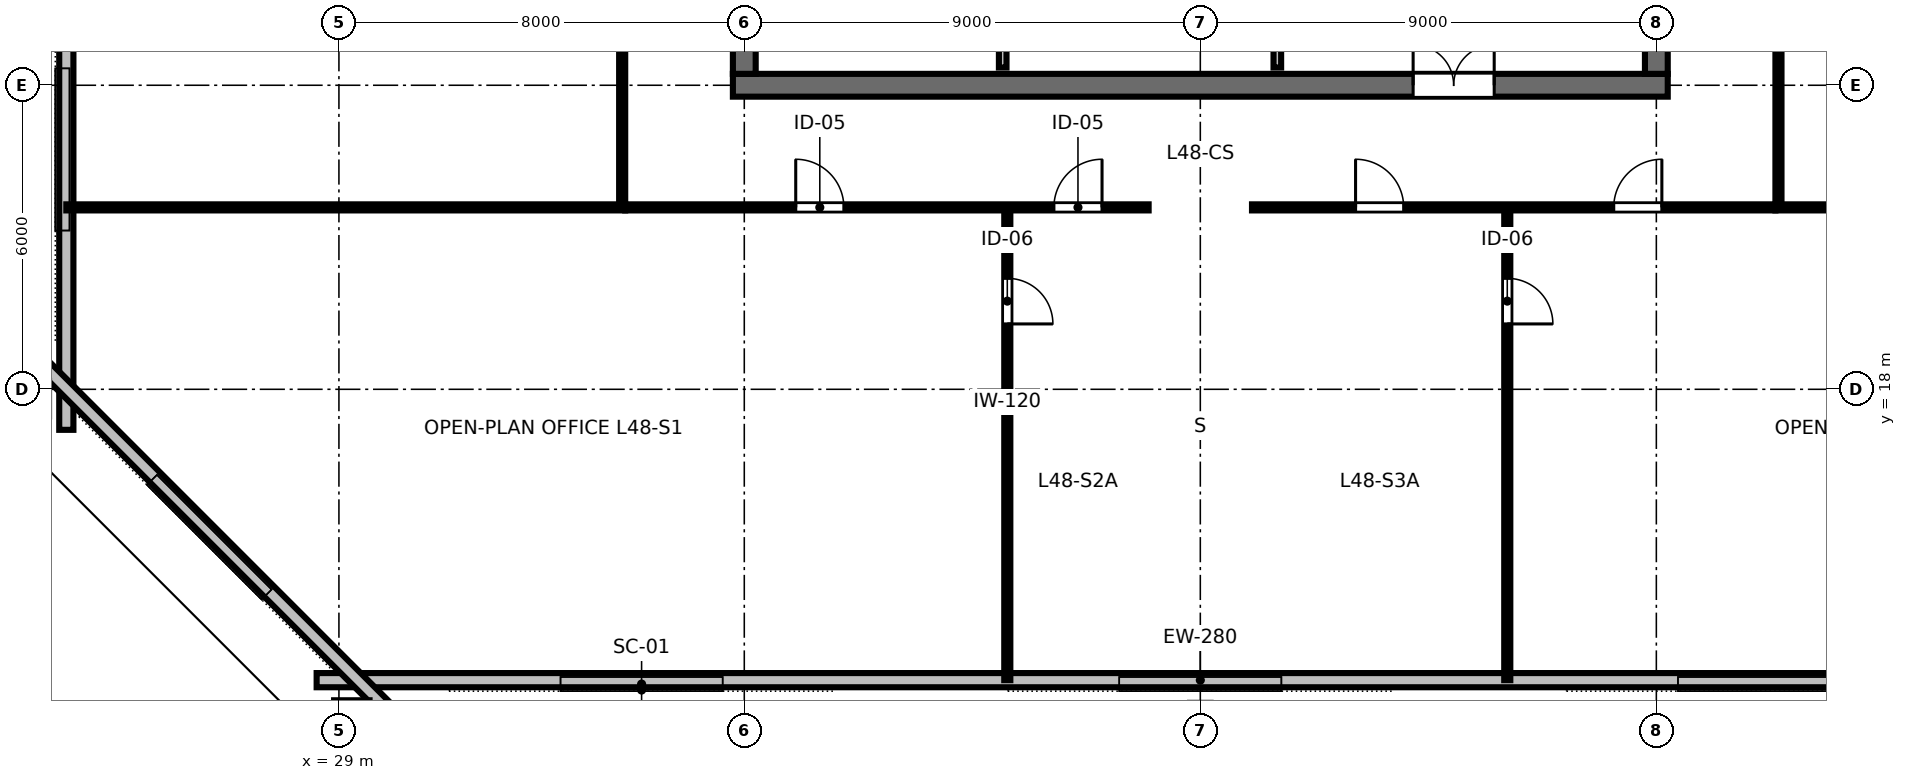
"""IFC4 building model, lengths in metres.
Left out: names, types, materials, properties, quantities, classifications, styles, units other than length and angle.
Written with IfcOpenShell. Run it as: python <this file> out.ifc"""

import sys

from ifc_helpers import new_model, si_unit, direction, frame, frame_2d, origin, origin_2d, place, context, subcontext, project, spatial, rectangle, hollow_rectangle, i_section, extrude, element, fill, save


model = new_model("IFC4")
c1 = context("Model", 3, precision=1e-05, world=origin(), true_north=direction((0.0, 1.0)))
c2 = subcontext(c1, "Body", "Model", "MODEL_VIEW")
j1 = project(units=[si_unit("LENGTHUNIT", "METRE"), si_unit("PLANEANGLEUNIT", "RADIAN")], contexts=[c1])
p1 = place(None, origin())
s1 = spatial("IfcSite", under=j1, at=p1, CompositionType="ELEMENT")
p2 = place(p1, origin())
s2 = spatial("IfcBuilding", under=s1, at=p2, CompositionType="ELEMENT")
p3 = place(p2, frame((0.0, 0.0, 184.2)))
s3 = spatial("IfcBuildingStorey", under=s2, at=p3, CompositionType="ELEMENT", Elevation=184.2)
p4 = place(p3, frame((36.775, 24.0, 0.0), z_axis=(0.0, 0.0, 1.0), x_axis=(1.0, 0.0, 0.0)))
e1 = element("IfcWall", 1, at=p4, inside=s3, PredefinedType="SHEAR", context=c2, shape_type="SweptSolid", body=[
    extrude(rectangle(XDim=18.45, YDim=0.45, at=frame_2d((9.225, 0.0))), origin(), (0.0, 0.0, 1.0), 3.36),
])
p5 = place(p4, frame((13.425, 0.0, 0.0)))
e2 = element("IfcOpeningElement", 2, at=p5, cuts=e1, PredefinedType="OPENING", context=c2, shape_type="SweptSolid", body=[
    extrude(rectangle(XDim=1.6, YDim=2.15, at=frame_2d((0.8, 1.075))), frame((0.0, 0.235, 0.0), z_axis=(0.0, -1.0, 0.0), x_axis=(1.0, 0.0, 0.0)), (0.0, 0.0, 1.0), 0.47),
])
p6 = place(p3, frame((37.0, 24.225, 0.0), z_axis=(0.0, 0.0, 1.0), x_axis=(0.0, 1.0, 0.0)))
e3 = element("IfcWall", 3, at=p6, inside=s3, PredefinedType="SHEAR", context=c2, shape_type="SweptSolid", body=[
    extrude(rectangle(XDim=15.55, YDim=0.45, at=frame_2d((7.775, 0.0))), origin(), (0.0, 0.0, 1.0), 3.36),
])
p7 = place(p6, frame((5.3, 0.0, 0.0)))
e4 = element("IfcOpeningElement", 4, at=p7, cuts=e3, PredefinedType="OPENING", context=c2, shape_type="SweptSolid", body=[
    extrude(rectangle(XDim=1.15, YDim=2.15, at=frame_2d((0.575, 1.075))), frame((0.0, 0.235, 0.0), z_axis=(0.0, -1.0, 0.0), x_axis=(1.0, 0.0, 0.0)), (0.0, 0.0, 1.0), 0.47),
])
p8 = place(p3, frame((55.0, 24.225, 0.0), z_axis=(0.0, 0.0, 1.0), x_axis=(0.0, 1.0, 0.0)))
e5 = element("IfcWall", 5, at=p8, inside=s3, PredefinedType="SHEAR", context=c2, shape_type="SweptSolid", body=[
    extrude(rectangle(XDim=15.55, YDim=0.45, at=frame_2d((7.775, 0.0))), origin(), (0.0, 0.0, 1.0), 3.36),
])
p9 = place(p8, frame((5.3, 0.0, 0.0)))
e6 = element("IfcOpeningElement", 6, at=p9, cuts=e5, PredefinedType="OPENING", context=c2, shape_type="SweptSolid", body=[
    extrude(rectangle(XDim=1.15, YDim=2.15, at=frame_2d((0.575, 1.075))), frame((0.0, 0.235, 0.0), z_axis=(0.0, -1.0, 0.0), x_axis=(1.0, 0.0, 0.0)), (0.0, 0.0, 1.0), 0.47),
])
p10 = place(p3, frame((29.255, 11.438, 0.0), z_axis=(0.252686968591, 0.187893668889, 0.949128687321), x_axis=(-0.596699148139, 0.802465031394, 0.0)))
e7 = element("IfcColumn", 7, at=p10, inside=s3, PredefinedType="COLUMN", context=c2, shape_type="SweptSolid", body=[
    extrude(hollow_rectangle(XDim=0.7, YDim=0.85, WallThickness=0.04, at=origin_2d()), origin(), (0.0, 0.0, 1.0), 3.538),
])
p11 = place(p3, frame((46.0, 11.6, 0.0), z_axis=(0.0, 0.192822575522, 0.981233639033), x_axis=(-1.0, 0.0, 0.0)))
e8 = element("IfcColumn", 8, at=p11, inside=s3, PredefinedType="COLUMN", context=c2, shape_type="SweptSolid", body=[
    extrude(i_section(OverallWidth=0.406, OverallDepth=0.425, WebThickness=0.033, FlangeThickness=0.052, FilletRadius=0.025, at=origin_2d()), origin(), (0.0, 0.0, 1.0), 3.422),
])
p12 = place(p3, frame((22.854, 17.816, 0.0), z_axis=(0.221678120535, 0.219053075792, 0.950197116846), x_axis=(-0.67588069394, -0.66787712075, 0.311649545384)))
e9 = element("IfcColumn", 9, at=p12, inside=s3, PredefinedType="COLUMN", context=c2, shape_type="SweptSolid", body=[
    extrude(hollow_rectangle(XDim=0.7, YDim=0.85, WallThickness=0.04, at=origin_2d()), origin(), (0.0, 0.0, 1.0), 3.534),
])
p13 = place(p3, frame((28.56, 12.26, 0.0), z_axis=(0.0, 0.0, 1.0), x_axis=(1.0, 0.0, 0.0)))
e10 = element("IfcWall", 10, at=p13, inside=s3, PredefinedType="STANDARD", context=c2, shape_type="SweptSolid", body=[
    extrude(rectangle(XDim=34.88, YDim=0.28, at=frame_2d((17.44, 0.0))), origin(), (0.0, 0.0, 1.0), 2.817),
])
p14 = place(p3, frame((23.62, 46.8, 0.0), z_axis=(0.0, 0.0, 1.0), x_axis=(0.0, -1.0, 0.0)))
e11 = element("IfcWall", 11, at=p14, inside=s3, PredefinedType="STANDARD", context=c2, shape_type="SweptSolid", body=[
    extrude(rectangle(XDim=29.6, YDim=0.28, at=frame_2d((14.8, 0.0))), origin(), (0.0, 0.0, 1.0), 2.817),
])
p15 = place(p3, frame((23.046, 18.585, 0.0), z_axis=(0.0, 0.0, 1.0), x_axis=(0.707106781187, -0.707106781187, 0.0)))
e12 = element("IfcWall", 12, at=p15, inside=s3, PredefinedType="STANDARD", context=c2, shape_type="SweptSolid", body=[
    extrude(rectangle(XDim=9.757, YDim=0.28, at=frame_2d((4.879, 0.0))), origin(), (0.0, 0.0, 1.0), 3.36),
])
p16 = place(p3, frame((42.1, 24.35, 0.0), z_axis=(0.0, 0.0, 1.0), x_axis=(0.0, 1.0, 0.0)))
e13 = element("IfcWall", 13, at=p16, inside=s3, PredefinedType="PARTITIONING", context=c2, shape_type="SweptSolid", body=[
    extrude(rectangle(XDim=3.9, YDim=0.15, at=frame_2d((1.95, 0.0))), origin(), (0.0, 0.0, 1.0), 3.36),
])
p17 = place(p16, frame((1.5, 0.0, 0.0)))
e14 = element("IfcOpeningElement", 14, at=p17, cuts=e13, PredefinedType="OPENING", context=c2, shape_type="SweptSolid", body=[
    extrude(rectangle(XDim=0.9, YDim=2.15, at=frame_2d((0.45, 1.075))), frame((0.0, 0.085, 0.0), z_axis=(0.0, -1.0, 0.0), x_axis=(1.0, 0.0, 0.0)), (0.0, 0.0, 1.0), 0.17),
])
p18 = place(p3, frame((47.52, 24.35, 0.0), z_axis=(0.0, 0.0, 1.0), x_axis=(0.0, 1.0, 0.0)))
e15 = element("IfcWall", 15, at=p18, inside=s3, PredefinedType="PARTITIONING", context=c2, shape_type="SweptSolid", body=[
    extrude(rectangle(XDim=3.9, YDim=0.15, at=frame_2d((1.95, 0.0))), origin(), (0.0, 0.0, 1.0), 3.36),
])
p19 = place(p18, frame((0.35, 0.0, 0.0)))
e16 = element("IfcOpeningElement", 16, at=p19, cuts=e15, PredefinedType="OPENING", context=c2, shape_type="SweptSolid", body=[
    extrude(rectangle(XDim=0.9, YDim=2.15, at=frame_2d((0.45, 1.075))), frame((0.0, 0.085, 0.0), z_axis=(0.0, -1.0, 0.0), x_axis=(1.0, 0.0, 0.0)), (0.0, 0.0, 1.0), 0.17),
])
p20 = place(p3, frame((42.191, 21.59, 0.0), z_axis=(0.0, 0.0, 1.0), x_axis=(0.0, -1.0, 0.0)))
e17 = element("IfcWall", 17, at=p20, inside=s3, PredefinedType="PARTITIONING", context=c2, shape_type="SweptSolid", body=[
    extrude(rectangle(XDim=9.33, YDim=0.12, at=frame_2d((4.665, 0.0))), origin(), (0.0, 0.0, 1.0), 2.64),
])
p21 = place(p20, frame((1.4, 0.0, 0.0)))
e18 = element("IfcOpeningElement", 18, at=p21, cuts=e17, PredefinedType="OPENING", context=c2, shape_type="SweptSolid", body=[
    extrude(rectangle(XDim=0.9, YDim=2.15, at=frame_2d((0.45, 1.075))), frame((0.0, 0.07, 0.0), z_axis=(0.0, -1.0, 0.0), x_axis=(1.0, 0.0, 0.0)), (0.0, 0.0, 1.0), 0.14),
])
p22 = place(p3, frame((52.058, 21.59, 0.0), z_axis=(0.0, 0.0, 1.0), x_axis=(0.0, -1.0, 0.0)))
e19 = element("IfcWall", 19, at=p22, inside=s3, PredefinedType="PARTITIONING", context=c2, shape_type="SweptSolid", body=[
    extrude(rectangle(XDim=9.33, YDim=0.12, at=frame_2d((4.665, 0.0))), origin(), (0.0, 0.0, 1.0), 2.64),
])
p23 = place(p22, frame((1.4, 0.0, 0.0)))
e20 = element("IfcOpeningElement", 20, at=p23, cuts=e19, PredefinedType="OPENING", context=c2, shape_type="SweptSolid", body=[
    extrude(rectangle(XDim=0.9, YDim=2.15, at=frame_2d((0.45, 1.075))), frame((0.0, 0.07, 0.0), z_axis=(0.0, -1.0, 0.0), x_axis=(1.0, 0.0, 0.0)), (0.0, 0.0, 1.0), 0.14),
])
p24 = place(p3, frame((34.65, 21.59, 0.0), z_axis=(0.0, 0.0, 1.0), x_axis=(1.0, 0.0, 0.0)))
e21 = element("IfcWall", 21, at=p24, inside=s3, PredefinedType="PARTITIONING", context=c2, shape_type="SweptSolid", body=[
    extrude(rectangle(XDim=10.33, YDim=0.12, at=frame_2d((5.165, 0.0))), origin(), (0.0, 0.0, 1.0), 2.64),
])
p25 = place(p24, frame((3.365, 0.0, 0.0)))
e22 = element("IfcOpeningElement", 22, at=p25, cuts=e21, PredefinedType="OPENING", context=c2, shape_type="SweptSolid", body=[
    extrude(rectangle(XDim=0.95, YDim=2.15, at=frame_2d((0.475, 1.075))), frame((0.0, 0.07, 0.0), z_axis=(0.0, -1.0, 0.0), x_axis=(1.0, 0.0, 0.0)), (0.0, 0.0, 1.0), 0.14),
])
p26 = place(p24, frame((8.46, 0.0, 0.0)))
e23 = element("IfcOpeningElement", 23, at=p26, cuts=e21, PredefinedType="OPENING", context=c2, shape_type="SweptSolid", body=[
    extrude(rectangle(XDim=0.95, YDim=2.15, at=frame_2d((0.475, 1.075))), frame((0.0, 0.07, 0.0), z_axis=(0.0, -1.0, 0.0), x_axis=(1.0, 0.0, 0.0)), (0.0, 0.0, 1.0), 0.14),
])
p27 = place(p3, frame((47.02, 21.59, 0.0), z_axis=(0.0, 0.0, 1.0), x_axis=(1.0, 0.0, 0.0)))
e24 = element("IfcWall", 24, at=p27, inside=s3, PredefinedType="PARTITIONING", context=c2, shape_type="SweptSolid", body=[
    extrude(rectangle(XDim=10.33, YDim=0.12, at=frame_2d((5.165, 0.0))), origin(), (0.0, 0.0, 1.0), 2.64),
])
p28 = place(p27, frame((2.044, 0.0, 0.0)))
e25 = element("IfcOpeningElement", 25, at=p28, cuts=e24, PredefinedType="OPENING", context=c2, shape_type="SweptSolid", body=[
    extrude(rectangle(XDim=0.95, YDim=2.15, at=frame_2d((0.475, 1.075))), frame((0.0, 0.07, 0.0), z_axis=(0.0, -1.0, 0.0), x_axis=(1.0, 0.0, 0.0)), (0.0, 0.0, 1.0), 0.14),
])
p29 = place(p27, frame((7.139, 0.0, 0.0)))
e26 = element("IfcOpeningElement", 26, at=p29, cuts=e24, PredefinedType="OPENING", context=c2, shape_type="SweptSolid", body=[
    extrude(rectangle(XDim=0.95, YDim=2.15, at=frame_2d((0.475, 1.075))), frame((0.0, 0.07, 0.0), z_axis=(0.0, -1.0, 0.0), x_axis=(1.0, 0.0, 0.0)), (0.0, 0.0, 1.0), 0.14),
])
p30 = place(p3, frame((34.59, 21.65, 0.0), z_axis=(0.0, 0.0, 1.0), x_axis=(0.0, 1.0, 0.0)))
e27 = element("IfcWall", 27, at=p30, inside=s3, PredefinedType="PARTITIONING", context=c2, shape_type="SweptSolid", body=[
    extrude(rectangle(XDim=20.7, YDim=0.12, at=frame_2d((10.35, 0.0))), origin(), (0.0, 0.0, 1.0), 2.64),
])
p31 = place(p30, frame((9.875, 0.0, 0.0)))
e28 = element("IfcOpeningElement", 28, at=p31, cuts=e27, PredefinedType="OPENING", context=c2, shape_type="SweptSolid", body=[
    extrude(rectangle(XDim=0.95, YDim=2.15, at=frame_2d((0.475, 1.075))), frame((0.0, 0.07, 0.0), z_axis=(0.0, -1.0, 0.0), x_axis=(1.0, 0.0, 0.0)), (0.0, 0.0, 1.0), 0.14),
])
p32 = place(p3, frame((57.41, 21.65, 0.0), z_axis=(0.0, 0.0, 1.0), x_axis=(0.0, 1.0, 0.0)))
e29 = element("IfcWall", 29, at=p32, inside=s3, PredefinedType="PARTITIONING", context=c2, shape_type="SweptSolid", body=[
    extrude(rectangle(XDim=20.7, YDim=0.12, at=frame_2d((10.35, 0.0))), origin(), (0.0, 0.0, 1.0), 2.64),
])
p33 = place(p32, frame((6.073, 0.0, 0.0)))
e30 = element("IfcOpeningElement", 30, at=p33, cuts=e29, PredefinedType="OPENING", context=c2, shape_type="SweptSolid", body=[
    extrude(rectangle(XDim=0.95, YDim=2.15, at=frame_2d((0.475, 1.075))), frame((0.0, 0.07, 0.0), z_axis=(0.0, -1.0, 0.0), x_axis=(1.0, 0.0, 0.0)), (0.0, 0.0, 1.0), 0.14),
])
p34 = place(p32, frame((16.223, 0.0, 0.0)))
e31 = element("IfcOpeningElement", 31, at=p34, cuts=e29, PredefinedType="OPENING", context=c2, shape_type="SweptSolid", body=[
    extrude(rectangle(XDim=0.95, YDim=2.15, at=frame_2d((0.475, 1.075))), frame((0.0, 0.07, 0.0), z_axis=(0.0, -1.0, 0.0), x_axis=(1.0, 0.0, 0.0)), (0.0, 0.0, 1.0), 0.14),
])
for number, where, z_axis, x_axis in (
    (32, (34.65, 21.59, 0.0), (0.0, 0.0, 1.0), (-1.0, 0.0, 0.0)),
    (33, (57.35, 21.59, 0.0), (0.0, 0.0, 1.0), (1.0, 0.0, 0.0)),
):
    element("IfcWall", number, at=place(p3, frame(where, z_axis=z_axis, x_axis=x_axis)), inside=s3, PredefinedType="PARTITIONING", context=c2, shape_type="SweptSolid", body=[
        extrude(rectangle(XDim=11.03, YDim=0.12, at=frame_2d((5.515, 0.0))), origin(), (0.0, 0.0, 1.0), 2.64),
    ])
p35 = place(p5, origin())
e34 = element("IfcDoor", 34, at=p35, inside=s3, OperationType="DOUBLE_DOOR_SINGLE_SWING", PredefinedType="DOOR", context=c2, shape_type="SweptSolid", body=[
    extrude(rectangle(XDim=1.6, YDim=2.15, at=frame_2d((0.8, 1.075))), frame((0.0, 0.025, 0.0), z_axis=(0.0, -1.0, 0.0), x_axis=(1.0, 0.0, 0.0)), (0.0, 0.0, 1.0), 0.05),
])
fill(e2, e34)
p36 = place(p21, origin())
e35 = element("IfcDoor", 35, at=p36, inside=s3, OperationType="SINGLE_SWING_RIGHT", PredefinedType="DOOR", context=c2, shape_type="SweptSolid", body=[
    extrude(rectangle(XDim=0.9, YDim=2.15, at=frame_2d((0.45, 1.075))), frame((0.0, 0.025, 0.0), z_axis=(0.0, -1.0, 0.0), x_axis=(1.0, 0.0, 0.0)), (0.0, 0.0, 1.0), 0.05),
])
fill(e18, e35)
p37 = place(p23, origin())
e36 = element("IfcDoor", 36, at=p37, inside=s3, OperationType="SINGLE_SWING_RIGHT", PredefinedType="DOOR", context=c2, shape_type="SweptSolid", body=[
    extrude(rectangle(XDim=0.9, YDim=2.15, at=frame_2d((0.45, 1.075))), frame((0.0, 0.025, 0.0), z_axis=(0.0, -1.0, 0.0), x_axis=(1.0, 0.0, 0.0)), (0.0, 0.0, 1.0), 0.05),
])
fill(e20, e36)
p38 = place(p25, origin())
e37 = element("IfcDoor", 37, at=p38, inside=s3, OperationType="SINGLE_SWING_LEFT", PredefinedType="DOOR", context=c2, shape_type="SweptSolid", body=[
    extrude(rectangle(XDim=0.95, YDim=2.15, at=frame_2d((0.475, 1.075))), frame((0.0, 0.025, 0.0), z_axis=(0.0, -1.0, 0.0), x_axis=(1.0, 0.0, 0.0)), (0.0, 0.0, 1.0), 0.05),
])
fill(e22, e37)
p39 = place(p26, origin())
e38 = element("IfcDoor", 38, at=p39, inside=s3, OperationType="SINGLE_SWING_RIGHT", PredefinedType="DOOR", context=c2, shape_type="SweptSolid", body=[
    extrude(rectangle(XDim=0.95, YDim=2.15, at=frame_2d((0.475, 1.075))), frame((0.0, 0.025, 0.0), z_axis=(0.0, -1.0, 0.0), x_axis=(1.0, 0.0, 0.0)), (0.0, 0.0, 1.0), 0.05),
])
fill(e23, e38)
p40 = place(p28, origin())
e39 = element("IfcDoor", 39, at=p40, inside=s3, OperationType="SINGLE_SWING_LEFT", PredefinedType="DOOR", context=c2, shape_type="SweptSolid", body=[
    extrude(rectangle(XDim=0.95, YDim=2.15, at=frame_2d((0.475, 1.075))), frame((0.0, 0.025, 0.0), z_axis=(0.0, -1.0, 0.0), x_axis=(1.0, 0.0, 0.0)), (0.0, 0.0, 1.0), 0.05),
])
fill(e25, e39)
p41 = place(p29, origin())
e40 = element("IfcDoor", 40, at=p41, inside=s3, OperationType="SINGLE_SWING_RIGHT", PredefinedType="DOOR", context=c2, shape_type="SweptSolid", body=[
    extrude(rectangle(XDim=0.95, YDim=2.15, at=frame_2d((0.475, 1.075))), frame((0.0, 0.025, 0.0), z_axis=(0.0, -1.0, 0.0), x_axis=(1.0, 0.0, 0.0)), (0.0, 0.0, 1.0), 0.05),
])
fill(e26, e40)
save(model, sys.argv[1])
